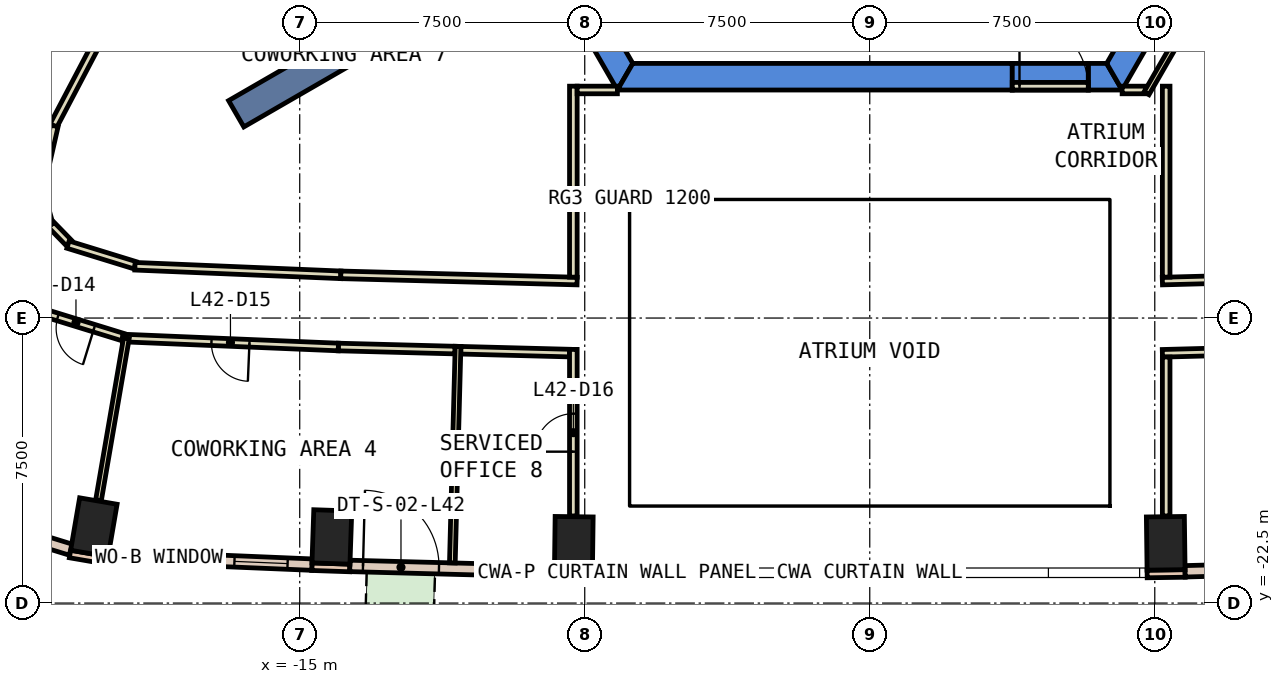
"""IFC4 building model, lengths in metres.
Left out: names, types, materials, properties, quantities, classifications, styles, units other than length and angle.
Written with IfcOpenShell. Run it as: python <this file> out.ifc"""

import sys

from ifc_helpers import new_model, si_unit, direction, frame, frame_2d, origin, origin_2d, place, context, subcontext, project, spatial, polyline, rectangle, outline, extrude, element, fill, save


model = new_model("IFC4")
c1 = context("Model", 3, precision=1e-05, world=origin(), true_north=direction((0.0, 1.0)))
c2 = subcontext(c1, "Body", "Model", "MODEL_VIEW")
j1 = project(units=[si_unit("LENGTHUNIT", "METRE"), si_unit("PLANEANGLEUNIT", "RADIAN")], contexts=[c1])
p1 = place(None, origin())
s1 = spatial("IfcSite", under=j1, at=p1, CompositionType="ELEMENT")
p2 = place(p1, origin())
s2 = spatial("IfcBuilding", under=s1, at=p2, CompositionType="ELEMENT")
p3 = place(p2, frame((0.0, 0.0, 189.8)))
s3 = spatial("IfcBuildingStorey", under=s2, at=p3, CompositionType="ELEMENT", Elevation=189.8)
for number, where, z_axis, x_axis in (
    (1, (-20.417, -20.505, 0.0), (0.0, 0.0, 1.0), (-0.986, 0.169, 0.0)),
    (2, (-14.154, -20.76, 0.0), (0.0, 0.0, 1.0), (-0.999, 0.034, 0.0)),
    (3, (-7.788, -20.927, 0.0), (0.0, 0.0, 1.0), (-1.0, 0.013, 0.0)),
    (4, (7.788, -20.927, 0.0), (0.0, 0.0, 1.0), (1.0, 0.013, 0.0)),
):
    element("IfcColumn", number, at=place(p3, frame(where, z_axis=z_axis, x_axis=x_axis)), inside=s3, PredefinedType="COLUMN", context=c2, shape_type="SweptSolid", body=[
        extrude(rectangle(XDim=1.0, YDim=1.4, at=origin_2d()), origin(), (0.0, 0.0, 1.0), 3.8),
    ])
p4 = place(p3, frame((0.0, 0.0, -0.6)))
e5 = element("IfcWall", 5, at=p4, inside=s3, PredefinedType="SHEAR", context=c2, shape_type="SweptSolid", body=[
    extrude(outline(polyline([(-13.279, 2.5), (-6.64, -9.0), (-6.235, -8.3), (-12.471, 2.5), (-13.279, 2.5)])), origin(), (0.0, 0.0, 1.0), 4.4),
])
p5 = place(p3, frame((0.0, 0.0, -0.6)))
e6 = element("IfcWall", 6, at=p5, inside=s3, PredefinedType="SHEAR", context=c2, shape_type="SweptSolid", body=[
    extrude(outline(polyline([(3.75, -9.0), (3.75, -8.3), (-6.235, -8.3), (-6.64, -9.0), (3.75, -9.0)])), origin(), (0.0, 0.0, 1.0), 4.4),
])
p6 = place(p3, frame((0.0, 0.0, -0.6)))
e7 = element("IfcWall", 7, at=p6, inside=s3, PredefinedType="SHEAR", context=c2, shape_type="SweptSolid", body=[
    extrude(outline(polyline([(5.75, -8.3), (5.75, -9.0), (6.64, -9.0), (6.235, -8.3), (5.75, -8.3)])), origin(), (0.0, 0.0, 1.0), 4.4),
])
p7 = place(p3, frame((0.0, 0.0, 3.6)))
e8 = element("IfcWall", 8, at=p7, inside=s3, PredefinedType="SHEAR", context=c2, shape_type="SweptSolid", body=[
    extrude(outline(polyline([(5.75, -9.0), (5.75, -8.3), (3.75, -8.3), (3.75, -9.0), (5.75, -9.0)])), origin(), (0.0, 0.0, 1.0), 0.2),
])
p8 = place(p3, frame((0.0, 0.0, -0.6)))
e9 = element("IfcWall", 9, at=p8, inside=s3, PredefinedType="SHEAR", context=c2, shape_type="SweptSolid", body=[
    extrude(outline(polyline([(6.64, -9.0), (13.279, 2.5), (12.471, 2.5), (6.235, -8.3), (6.64, -9.0)])), origin(), (0.0, 0.0, 1.0), 4.4),
])
for number, where, z_axis, x_axis in (
    (10, (8.877, -5.125, -0.6), (0.0, 0.0, 1.0), (0.866, -0.5, 0.0)),
    (11, (-8.877, -5.125, -0.6), (0.0, 0.0, 1.0), (-0.866, -0.5, 0.0)),
):
    element("IfcWall", number, at=place(p3, frame(where, z_axis=z_axis, x_axis=x_axis)), inside=s3, PredefinedType="SHEAR", context=c2, shape_type="SweptSolid", body=[
        extrude(rectangle(XDim=9.0, YDim=0.8, at=frame_2d((4.5, 0.0))), origin(), (0.0, 0.0, 1.0), 4.4),
    ])
p9 = place(p3, frame((-21.045, -21.209, 0.0), z_axis=(0.0, 0.0, 1.0), x_axis=(0.985631544579, -0.168909615862, 0.0)))
e12 = element("IfcWall", 12, at=p9, inside=s3, PredefinedType="STANDARD", context=c2, shape_type="SweptSolid", body=[
    extrude(rectangle(XDim=1.0, YDim=0.2, at=frame_2d((0.5, 0.0))), origin(), (0.0, 0.0, 1.0), 3.8),
])
p10 = place(p3, frame((-14.681, -21.542, 0.0), z_axis=(0.0, 0.0, 1.0), x_axis=(0.999423561854, -0.033949138587, 0.0)))
e13 = element("IfcWall", 13, at=p10, inside=s3, PredefinedType="STANDARD", context=c2, shape_type="SweptSolid", body=[
    extrude(rectangle(XDim=1.0, YDim=0.2, at=frame_2d((0.5, 0.0))), origin(), (0.0, 0.0, 1.0), 3.8),
])
for number, where, z_axis, x_axis in (
    (14, (-8.299, -21.72, 0.0), (0.0, 0.0, 1.0), (1.0, -0.014, 0.0)),
    (15, (7.299, -21.734, 0.0), (0.0, 0.0, 1.0), (1.0, 0.014, 0.0)),
):
    element("IfcWall", number, at=place(p3, frame(where, z_axis=z_axis, x_axis=x_axis)), inside=s3, PredefinedType="STANDARD", context=c2, shape_type="SweptSolid", body=[
        extrude(rectangle(XDim=1.0, YDim=0.2, at=frame_2d((0.5, 0.0))), origin(), (0.0, 0.0, 1.0), 3.8),
    ])
p11 = place(p3, frame((-20.041, -21.264, 0.0), z_axis=(0.0, 0.0, 1.0), x_axis=(0.999127941775, -0.041753514387, 0.0)))
e16 = element("IfcWall", 16, at=p11, inside=s3, PredefinedType="STANDARD", context=c2, shape_type="SweptSolid", body=[
    extrude(rectangle(XDim=5.368, YDim=0.3, at=frame_2d((2.684, 0.0))), origin(), (0.0, 0.0, 1.0), 3.8),
])
p12 = place(p11, frame((0.642, 0.0, 0.9)))
e17 = element("IfcOpeningElement", 17, at=p12, cuts=e16, PredefinedType="OPENING", context=c2, shape_type="SweptSolid", body=[
    extrude(rectangle(XDim=1.4, YDim=2.6, at=frame_2d((0.7, 1.3))), frame((0.0, 0.16, 0.0), z_axis=(0.0, -1.0, 0.0), x_axis=(1.0, 0.0, 0.0)), (0.0, 0.0, 1.0), 0.32),
])
p13 = place(p11, frame((3.326, 0.0, 0.9)))
e18 = element("IfcOpeningElement", 18, at=p13, cuts=e16, PredefinedType="OPENING", context=c2, shape_type="SweptSolid", body=[
    extrude(rectangle(XDim=1.4, YDim=2.6, at=frame_2d((0.7, 1.3))), frame((0.0, 0.16, 0.0), z_axis=(0.0, -1.0, 0.0), x_axis=(1.0, 0.0, 0.0)), (0.0, 0.0, 1.0), 0.32),
])
p14 = place(p3, frame((-13.681, -21.522, 0.0), z_axis=(0.0, 0.0, 1.0), x_axis=(0.999651908676, -0.026382977093, 0.0)))
e19 = element("IfcWall", 19, at=p14, inside=s3, PredefinedType="STANDARD", context=c2, shape_type="SweptSolid", body=[
    extrude(rectangle(XDim=5.386, YDim=0.3, at=frame_2d((2.693, 0.0))), origin(), (0.0, 0.0, 1.0), 3.8),
])
p15 = place(p14, frame((0.346, 0.0, 0.0)))
e20 = element("IfcOpeningElement", 20, at=p15, cuts=e19, PredefinedType="OPENING", context=c2, shape_type="SweptSolid", body=[
    extrude(rectangle(XDim=2.0, YDim=2.4, at=frame_2d((1.0, 1.2))), frame((0.0, 0.16, 0.0), z_axis=(0.0, -1.0, 0.0), x_axis=(1.0, 0.0, 0.0)), (0.0, 0.0, 1.0), 0.32),
])
p16 = place(p14, frame((3.339, 0.0, 0.9)))
e21 = element("IfcOpeningElement", 21, at=p16, cuts=e19, PredefinedType="OPENING", context=c2, shape_type="SweptSolid", body=[
    extrude(rectangle(XDim=1.4, YDim=2.6, at=frame_2d((0.7, 1.3))), frame((0.0, 0.16, 0.0), z_axis=(0.0, -1.0, 0.0), x_axis=(1.0, 0.0, 0.0)), (0.0, 0.0, 1.0), 0.32),
])
p17 = place(p3, frame((8.297, -21.664, 0.0), z_axis=(0.0, 0.0, 1.0), x_axis=(0.999651908676, 0.026382977093, 0.0)))
e22 = element("IfcWall", 22, at=p17, inside=s3, PredefinedType="STANDARD", context=c2, shape_type="SweptSolid", body=[
    extrude(rectangle(XDim=5.386, YDim=0.3, at=frame_2d((2.693, 0.0))), origin(), (0.0, 0.0, 1.0), 3.8),
])
p18 = place(p17, frame((0.646, 0.0, 0.9)))
e23 = element("IfcOpeningElement", 23, at=p18, cuts=e22, PredefinedType="OPENING", context=c2, shape_type="SweptSolid", body=[
    extrude(rectangle(XDim=1.4, YDim=2.6, at=frame_2d((0.7, 1.3))), frame((0.0, 0.16, 0.0), z_axis=(0.0, -1.0, 0.0), x_axis=(1.0, 0.0, 0.0)), (0.0, 0.0, 1.0), 0.32),
])
p19 = place(p17, frame((3.339, 0.0, 0.9)))
e24 = element("IfcOpeningElement", 24, at=p19, cuts=e22, PredefinedType="OPENING", context=c2, shape_type="SweptSolid", body=[
    extrude(rectangle(XDim=1.4, YDim=2.6, at=frame_2d((0.7, 1.3))), frame((0.0, 0.16, 0.0), z_axis=(0.0, -1.0, 0.0), x_axis=(1.0, 0.0, 0.0)), (0.0, 0.0, 1.0), 0.32),
])
p20 = place(p3, frame((-24.624, -19.986, 0.0), z_axis=(0.0, 0.0, 1.0), x_axis=(0.955692086233, -0.29436819854, 0.0)))
e25 = element("IfcWall", 25, at=p20, inside=s3, PredefinedType="STANDARD", context=c2, shape_type="SweptSolid", body=[
    extrude(rectangle(XDim=3.767, YDim=0.3, at=frame_2d((1.884, 0.0))), origin(), (0.0, 0.0, 1.0), 3.8),
])
p21 = place(p20, frame((1.183, 0.0, 0.9)))
e26 = element("IfcOpeningElement", 26, at=p21, cuts=e25, PredefinedType="OPENING", context=c2, shape_type="SweptSolid", body=[
    extrude(rectangle(XDim=1.4, YDim=2.6, at=frame_2d((0.7, 1.3))), frame((0.0, 0.16, 0.0), z_axis=(0.0, -1.0, 0.0), x_axis=(1.0, 0.0, 0.0)), (0.0, 0.0, 1.0), 0.32),
])
p22 = place(p3, frame((7.7, -14.027, 0.0), z_axis=(0.0, 0.0, 1.0), x_axis=(0.999653919353, 0.026306682088, 0.0)))
e27 = element("IfcWall", 27, at=p22, inside=s3, PredefinedType="PARTITIONING", context=c2, shape_type="SweptSolid", body=[
    extrude(rectangle(XDim=6.162, YDim=0.2, at=frame_2d((3.081, 0.0))), origin(), (0.0, 0.0, 1.0), 3.8),
])
p23 = place(p22, frame((2.581, 0.0, 0.0)))
e28 = element("IfcOpeningElement", 28, at=p23, cuts=e27, PredefinedType="OPENING", context=c2, shape_type="SweptSolid", body=[
    extrude(rectangle(XDim=1.0, YDim=2.1, at=frame_2d((0.5, 1.05))), frame((0.0, 0.11, 0.0), z_axis=(0.0, -1.0, 0.0), x_axis=(1.0, 0.0, 0.0)), (0.0, 0.0, 1.0), 0.22),
])
p24 = place(p3, frame((-18.112, -3.531, 0.0), z_axis=(0.0, 0.0, 1.0), x_axis=(-0.465461327558, -0.885068219149, 0.0)))
e29 = element("IfcWall", 29, at=p24, inside=s3, PredefinedType="PARTITIONING", context=c2, shape_type="SweptSolid", body=[
    extrude(rectangle(XDim=7.236, YDim=0.2, at=frame_2d((3.618, 0.0))), origin(), (0.0, 0.0, 1.0), 3.8),
])
p25 = place(p3, frame((-21.456, -9.944, 0.0), z_axis=(0.0, 0.0, 1.0), x_axis=(-0.222871656966, -0.974847795567, 0.0)))
e30 = element("IfcWall", 30, at=p25, inside=s3, PredefinedType="PARTITIONING", context=c2, shape_type="SweptSolid", body=[
    extrude(rectangle(XDim=1.839, YDim=0.2, at=frame_2d((0.919, 0.0))), origin(), (0.0, 0.0, 1.0), 3.8),
])
p26 = place(p3, frame((-21.816, -11.735, 0.0), z_axis=(0.0, 0.0, 1.0), x_axis=(0.270192443589, -0.962806337447, 0.0)))
e31 = element("IfcWall", 31, at=p26, inside=s3, PredefinedType="PARTITIONING", context=c2, shape_type="SweptSolid", body=[
    extrude(rectangle(XDim=0.869, YDim=0.2, at=frame_2d((0.435, 0.0))), origin(), (0.0, 0.0, 1.0), 3.8),
])
p27 = place(p3, frame((-21.538, -12.547, 0.0), z_axis=(0.0, 0.0, 1.0), x_axis=(0.697542638825, -0.716543276446, 0.0)))
e32 = element("IfcWall", 32, at=p27, inside=s3, PredefinedType="PARTITIONING", context=c2, shape_type="SweptSolid", body=[
    extrude(rectangle(XDim=0.668, YDim=0.2, at=frame_2d((0.334, 0.0))), origin(), (0.0, 0.0, 1.0), 3.8),
])
p28 = place(p3, frame((-21.097, -13.068, 0.0), z_axis=(0.0, 0.0, 1.0), x_axis=(0.955790442908, -0.294048685161, 0.0)))
e33 = element("IfcWall", 33, at=p28, inside=s3, PredefinedType="PARTITIONING", context=c2, shape_type="SweptSolid", body=[
    extrude(rectangle(XDim=1.846, YDim=0.2, at=frame_2d((0.923, 0.0))), origin(), (0.0, 0.0, 1.0), 3.8),
])
p29 = place(p3, frame((-19.336, -13.637, 0.0), z_axis=(0.0, 0.0, 1.0), x_axis=(0.999130261307, -0.041697972867, 0.0)))
e34 = element("IfcWall", 34, at=p29, inside=s3, PredefinedType="PARTITIONING", context=c2, shape_type="SweptSolid", body=[
    extrude(rectangle(XDim=5.422, YDim=0.2, at=frame_2d((2.711, 0.0))), origin(), (0.0, 0.0, 1.0), 3.8),
])
p30 = place(p3, frame((-13.919, -13.863, 0.0), z_axis=(0.0, 0.0, 1.0), x_axis=(0.999652206272, -0.026371698764, 0.0)))
e35 = element("IfcWall", 35, at=p30, inside=s3, PredefinedType="PARTITIONING", context=c2, shape_type="SweptSolid", body=[
    extrude(rectangle(XDim=6.221, YDim=0.2, at=frame_2d((3.111, 0.0))), origin(), (0.0, 0.0, 1.0), 3.8),
])
p31 = place(p3, frame((14.059, -15.76, 0.0), z_axis=(0.0, 0.0, 1.0), x_axis=(-0.999651338269, -0.026404580978, 0.0)))
e36 = element("IfcWall", 36, at=p31, inside=s3, PredefinedType="PARTITIONING", context=c2, shape_type="SweptSolid", body=[
    extrude(rectangle(XDim=6.361, YDim=0.2, at=frame_2d((3.181, 0.0))), origin(), (0.0, 0.0, 1.0), 3.8),
])
p32 = place(p31, frame((2.681, 0.0, 0.0)))
e37 = element("IfcOpeningElement", 37, at=p32, cuts=e36, PredefinedType="OPENING", context=c2, shape_type="SweptSolid", body=[
    extrude(rectangle(XDim=1.0, YDim=2.1, at=frame_2d((0.5, 1.05))), frame((0.0, 0.11, 0.0), z_axis=(0.0, -1.0, 0.0), x_axis=(1.0, 0.0, 0.0)), (0.0, 0.0, 1.0), 0.22),
])
p33 = place(p3, frame((-19.657, -15.5, 0.0), z_axis=(0.0, 0.0, 1.0), x_axis=(-0.955612889251, 0.294625195625, 0.0)))
e38 = element("IfcWall", 38, at=p33, inside=s3, PredefinedType="PARTITIONING", context=c2, shape_type="SweptSolid", body=[
    extrude(rectangle(XDim=2.576, YDim=0.2, at=frame_2d((1.288, 0.0))), origin(), (0.0, 0.0, 1.0), 3.8),
])
p34 = place(p33, frame((0.788, 0.0, 0.0)))
e39 = element("IfcOpeningElement", 39, at=p34, cuts=e38, PredefinedType="OPENING", context=c2, shape_type="SweptSolid", body=[
    extrude(rectangle(XDim=1.0, YDim=2.1, at=frame_2d((0.5, 1.05))), frame((0.0, 0.11, 0.0), z_axis=(0.0, -1.0, 0.0), x_axis=(1.0, 0.0, 0.0)), (0.0, 0.0, 1.0), 0.22),
])
p35 = place(p3, frame((-10.912, -15.843, 0.0), z_axis=(0.0, 0.0, 1.0), x_axis=(-0.999652047394, 0.026377720532, 0.0)))
e40 = element("IfcWall", 40, at=p35, inside=s3, PredefinedType="PARTITIONING", context=c2, shape_type="SweptSolid", body=[
    extrude(rectangle(XDim=3.073, YDim=0.2, at=frame_2d((1.536, 0.0))), origin(), (0.0, 0.0, 1.0), 3.8),
])
p36 = place(p3, frame((-13.984, -15.762, 0.0), z_axis=(0.0, 0.0, 1.0), x_axis=(-0.999129271091, 0.041721692781, 0.0)))
e41 = element("IfcWall", 41, at=p36, inside=s3, PredefinedType="PARTITIONING", context=c2, shape_type="SweptSolid", body=[
    extrude(rectangle(XDim=5.682, YDim=0.2, at=frame_2d((2.841, 0.0))), origin(), (0.0, 0.0, 1.0), 3.8),
])
p37 = place(p36, frame((2.341, 0.0, 0.0)))
e42 = element("IfcOpeningElement", 42, at=p37, cuts=e41, PredefinedType="OPENING", context=c2, shape_type="SweptSolid", body=[
    extrude(rectangle(XDim=1.0, YDim=2.1, at=frame_2d((0.5, 1.05))), frame((0.0, 0.11, 0.0), z_axis=(0.0, -1.0, 0.0), x_axis=(1.0, 0.0, 0.0)), (0.0, 0.0, 1.0), 0.22),
])
p38 = place(p3, frame((-7.9, -15.922, 0.0), z_axis=(0.0, 0.0, 1.0), x_axis=(-0.999655039681, 0.026264075085, 0.0)))
e43 = element("IfcWall", 43, at=p38, inside=s3, PredefinedType="PARTITIONING", context=c2, shape_type="SweptSolid", body=[
    extrude(rectangle(XDim=2.863, YDim=0.2, at=frame_2d((1.432, 0.0))), origin(), (0.0, 0.0, 1.0), 3.8),
])
p39 = place(p3, frame((6.641, -8.999, 0.0), z_axis=(0.0, 0.0, 1.0), x_axis=(1.0, 0.0, 0.0)))
e44 = element("IfcWall", 44, at=p39, inside=s3, PredefinedType="PARTITIONING", context=c2, shape_type="SweptSolid", body=[
    extrude(rectangle(XDim=0.617, YDim=0.2, at=frame_2d((0.309, 0.0))), origin(), (0.0, 0.0, 1.0), 3.8),
])
p40 = place(p3, frame((7.283, -9.086, 0.0), z_axis=(0.0, 0.0, 1.0), x_axis=(0.499843936326, 0.866115488442, 0.0)))
e45 = element("IfcWall", 45, at=p40, inside=s3, PredefinedType="PARTITIONING", context=c2, shape_type="SweptSolid", body=[
    extrude(rectangle(XDim=3.827, YDim=0.15, at=frame_2d((1.914, 0.0))), origin(), (0.0, 0.0, 1.0), 3.8),
])
for number, where, z_axis, x_axis in (
    (46, (7.8, -8.899, 0.0), (0.0, 0.0, 1.0), (0.0, -1.0, 0.0)),
    (47, (-7.8, -13.924, 0.0), (0.0, 0.0, 1.0), (0.0, 1.0, 0.0)),
):
    element("IfcWall", number, at=place(p3, frame(where, z_axis=z_axis, x_axis=x_axis)), inside=s3, PredefinedType="PARTITIONING", context=c2, shape_type="SweptSolid", body=[
        extrude(rectangle(XDim=5.025, YDim=0.2, at=frame_2d((2.513, 0.0))), origin(), (0.0, 0.0, 1.0), 3.8),
    ])
p41 = place(p3, frame((-7.7, -8.999, 0.0), z_axis=(0.0, 0.0, 1.0), x_axis=(1.0, 0.0, 0.0)))
e48 = element("IfcWall", 48, at=p41, inside=s3, PredefinedType="PARTITIONING", context=c2, shape_type="SweptSolid", body=[
    extrude(rectangle(XDim=1.059, YDim=0.2, at=frame_2d((0.529, 0.0))), origin(), (0.0, 0.0, 1.0), 3.8),
])
p42 = place(p3, frame((7.8, -16.025, 0.0), z_axis=(0.0, 0.0, 1.0), x_axis=(0.0, -1.0, 0.0)))
e49 = element("IfcWall", 49, at=p42, inside=s3, PredefinedType="PARTITIONING", context=c2, shape_type="SweptSolid", body=[
    extrude(rectangle(XDim=4.182, YDim=0.2, at=frame_2d((2.091, 0.0))), origin(), (0.0, 0.0, 1.0), 3.8),
])
p43 = place(p3, frame((-7.8, -20.207, 0.0), z_axis=(0.0, 0.0, 1.0), x_axis=(0.0, 1.0, 0.0)))
e50 = element("IfcWall", 50, at=p43, inside=s3, PredefinedType="PARTITIONING", context=c2, shape_type="SweptSolid", body=[
    extrude(rectangle(XDim=4.382, YDim=0.2, at=frame_2d((2.191, 0.0))), origin(), (0.0, 0.0, 1.0), 3.8),
])
p44 = place(p43, frame((1.691, 0.0, 0.0)))
e51 = element("IfcOpeningElement", 51, at=p44, cuts=e50, PredefinedType="OPENING", context=c2, shape_type="SweptSolid", body=[
    extrude(rectangle(XDim=1.0, YDim=2.1, at=frame_2d((0.5, 1.05))), frame((0.0, 0.11, 0.0), z_axis=(0.0, -1.0, 0.0), x_axis=(1.0, 0.0, 0.0)), (0.0, 0.0, 1.0), 0.22),
])
p45 = place(p3, frame((-19.561, -15.529, 0.0), z_axis=(0.0, 0.0, 1.0), x_axis=(-0.169546150064, -0.98552224886, 0.0)))
e52 = element("IfcWall", 52, at=p45, inside=s3, PredefinedType="PARTITIONING", context=c2, shape_type="SweptSolid", body=[
    extrude(rectangle(XDim=4.329, YDim=0.15, at=frame_2d((2.164, 0.0))), origin(), (0.0, 0.0, 1.0), 3.8),
])
p46 = place(p3, frame((-10.834, -15.745, 0.0), z_axis=(0.0, 0.0, 1.0), x_axis=(-0.026298797458, -0.999654126812, 0.0)))
e53 = element("IfcWall", 53, at=p46, inside=s3, PredefinedType="PARTITIONING", context=c2, shape_type="SweptSolid", body=[
    extrude(rectangle(XDim=5.7, YDim=0.15, at=frame_2d((2.85, 0.0))), origin(), (0.0, 0.0, 1.0), 3.8),
])
p47 = place(p3, frame((3.75, -8.9, 0.0), z_axis=(0.0, 0.0, 1.0), x_axis=(1.0, 0.0, 0.0)))
e54 = element("IfcWall", 54, at=p47, inside=s3, PredefinedType="PARTITIONING", context=c2, shape_type="SweptSolid", body=[
    extrude(rectangle(XDim=2.0, YDim=0.2, at=frame_2d((1.0, 0.0))), origin(), (0.0, 0.0, 1.0), 2.4),
])
p48 = place(p47, frame((0.19, 0.0, 0.0)))
e55 = element("IfcOpeningElement", 55, at=p48, cuts=e54, PredefinedType="OPENING", context=c2, shape_type="SweptSolid", body=[
    extrude(rectangle(XDim=1.8, YDim=2.1, at=frame_2d((0.9, 1.05))), frame((0.0, 0.11, 0.0), z_axis=(0.0, -1.0, 0.0), x_axis=(1.0, 0.0, 0.0)), (0.0, 0.0, 1.0), 0.22),
])
p49 = place(p12, origin())
e56 = element("IfcWindow", 56, at=p49, inside=s3, PartitioningType="SINGLE_PANEL", PredefinedType="WINDOW", context=c2, shape_type="SweptSolid", body=[
    extrude(rectangle(XDim=1.4, YDim=2.6, at=frame_2d((0.7, 1.3))), frame((0.0, 0.03, 0.0), z_axis=(0.0, -1.0, 0.0), x_axis=(1.0, 0.0, 0.0)), (0.0, 0.0, 1.0), 0.06),
])
fill(e17, e56)
p50 = place(p13, origin())
e57 = element("IfcWindow", 57, at=p50, inside=s3, PartitioningType="SINGLE_PANEL", PredefinedType="WINDOW", context=c2, shape_type="SweptSolid", body=[
    extrude(rectangle(XDim=1.4, YDim=2.6, at=frame_2d((0.7, 1.3))), frame((0.0, 0.03, 0.0), z_axis=(0.0, -1.0, 0.0), x_axis=(1.0, 0.0, 0.0)), (0.0, 0.0, 1.0), 0.06),
])
fill(e18, e57)
p51 = place(p15, origin())
e58 = element("IfcDoor", 58, at=p51, inside=s3, OperationType="SLIDING_TO_LEFT", PredefinedType="DOOR", context=c2, shape_type="SweptSolid", body=[
    extrude(rectangle(XDim=2.0, YDim=2.4, at=frame_2d((1.0, 1.2))), frame((0.0, 0.025, 0.0), z_axis=(0.0, -1.0, 0.0), x_axis=(1.0, 0.0, 0.0)), (0.0, 0.0, 1.0), 0.05),
])
fill(e20, e58)
p52 = place(p16, origin())
e59 = element("IfcWindow", 59, at=p52, inside=s3, PartitioningType="SINGLE_PANEL", PredefinedType="WINDOW", context=c2, shape_type="SweptSolid", body=[
    extrude(rectangle(XDim=1.4, YDim=2.6, at=frame_2d((0.7, 1.3))), frame((0.0, 0.03, 0.0), z_axis=(0.0, -1.0, 0.0), x_axis=(1.0, 0.0, 0.0)), (0.0, 0.0, 1.0), 0.06),
])
fill(e21, e59)
p53 = place(p34, origin())
e60 = element("IfcDoor", 60, at=p53, inside=s3, OperationType="SINGLE_SWING_LEFT", PredefinedType="DOOR", context=c2, shape_type="SweptSolid", body=[
    extrude(rectangle(XDim=1.0, YDim=2.1, at=frame_2d((0.5, 1.05))), frame((0.0, 0.025, 0.0), z_axis=(0.0, -1.0, 0.0), x_axis=(1.0, 0.0, 0.0)), (0.0, 0.0, 1.0), 0.05),
])
fill(e39, e60)
p54 = place(p37, origin())
e61 = element("IfcDoor", 61, at=p54, inside=s3, OperationType="SINGLE_SWING_LEFT", PredefinedType="DOOR", context=c2, shape_type="SweptSolid", body=[
    extrude(rectangle(XDim=1.0, YDim=2.1, at=frame_2d((0.5, 1.05))), frame((0.0, 0.025, 0.0), z_axis=(0.0, -1.0, 0.0), x_axis=(1.0, 0.0, 0.0)), (0.0, 0.0, 1.0), 0.05),
])
fill(e42, e61)
p55 = place(p44, origin())
e62 = element("IfcDoor", 62, at=p55, inside=s3, OperationType="SINGLE_SWING_LEFT", PredefinedType="DOOR", context=c2, shape_type="SweptSolid", body=[
    extrude(rectangle(XDim=1.0, YDim=2.1, at=frame_2d((0.5, 1.05))), frame((0.0, 0.025, 0.0), z_axis=(0.0, -1.0, 0.0), x_axis=(1.0, 0.0, 0.0)), (0.0, 0.0, 1.0), 0.05),
])
fill(e51, e62)
p56 = place(p48, origin())
e63 = element("IfcDoor", 63, at=p56, inside=s3, OperationType="DOUBLE_DOOR_SINGLE_SWING", PredefinedType="DOOR", context=c2, shape_type="SweptSolid", body=[
    extrude(rectangle(XDim=1.8, YDim=2.1, at=frame_2d((0.9, 1.05))), frame((0.0, 0.025, 0.0), z_axis=(0.0, -1.0, 0.0), x_axis=(1.0, 0.0, 0.0)), (0.0, 0.0, 1.0), 0.05),
])
fill(e55, e63)
save(model, sys.argv[1])
